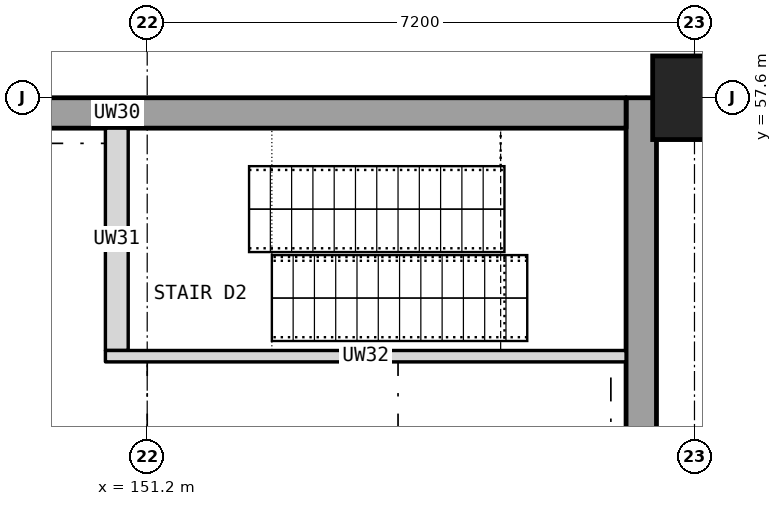
"""IFC4 building model, lengths in metres.
Left out: names, types, materials, properties, quantities, classifications, styles, units other than length and angle.
Written with IfcOpenShell. Run it as: python <this file> out.ifc"""

import sys

from ifc_helpers import new_model, si_unit, direction, frame, frame_2d, origin, origin_2d, place, context, subcontext, project, spatial, rectangle, extrude, element, save


model = new_model("IFC4")
c1 = context("Model", 3, precision=1e-05, world=origin(), true_north=direction((0.0, 1.0)))
c2 = subcontext(c1, "Body", "Model", "MODEL_VIEW")
j1 = project(units=[si_unit("LENGTHUNIT", "METRE"), si_unit("PLANEANGLEUNIT", "RADIAN")], contexts=[c1])
p1 = place(None, origin())
s1 = spatial("IfcSite", under=j1, at=p1, CompositionType="ELEMENT")
p2 = place(p1, origin())
s2 = spatial("IfcBuilding", under=s1, at=p2, CompositionType="ELEMENT")
p3 = place(p2, frame((0.0, 0.0, 12.0)))
s3 = spatial("IfcBuildingStorey", under=s2, at=p3, CompositionType="ELEMENT", Elevation=12.0)
p4 = place(p3, frame((158.4, 57.6, 0.0), z_axis=(0.0, 0.0, 1.0), x_axis=(1.0, 0.0, 0.0)))
e1 = element("IfcColumn", 1, at=p4, inside=s3, PredefinedType="COLUMN", context=c2, shape_type="SweptSolid", body=[
    extrude(rectangle(XDim=1.1, YDim=1.1, at=origin_2d()), origin(), (0.0, 0.0, 1.0), 4.5),
])
p5 = place(p3, frame((157.7, 36.0, 0.0), z_axis=(0.0, 0.0, 1.0), x_axis=(0.0, 1.0, 0.0)))
e2 = element("IfcWall", 2, at=p5, inside=s3, PredefinedType="SHEAR", context=c2, shape_type="SweptSolid", body=[
    extrude(rectangle(XDim=21.6, YDim=0.4, at=frame_2d((10.8, 0.0))), origin(), (0.0, 0.0, 1.0), 4.15),
])
p6 = place(p3, frame((144.11, 57.4, 0.0), z_axis=(0.0, 0.0, 1.0), x_axis=(1.0, 0.0, 0.0)))
e3 = element("IfcWall", 3, at=p6, inside=s3, PredefinedType="SHEAR", context=c2, shape_type="SweptSolid", body=[
    extrude(rectangle(XDim=13.39, YDim=0.4, at=frame_2d((6.695, 0.0))), origin(), (0.0, 0.0, 1.0), 4.15),
])
p7 = place(p3, frame((150.8, 54.275, 0.0), z_axis=(0.0, 0.0, 1.0), x_axis=(0.0, 1.0, 0.0)))
e4 = element("IfcWall", 4, at=p7, inside=s3, PredefinedType="SHEAR", context=c2, shape_type="SweptSolid", body=[
    extrude(rectangle(XDim=2.925, YDim=0.3, at=frame_2d((1.462, 0.0))), origin(), (0.0, 0.0, 1.0), 4.15),
])
p8 = place(p3, frame((150.65, 54.2, 0.0), z_axis=(0.0, 0.0, 1.0), x_axis=(1.0, 0.0, 0.0)))
e5 = element("IfcWall", 5, at=p8, inside=s3, PredefinedType="SHEAR", context=c2, shape_type="SweptSolid", body=[
    extrude(rectangle(XDim=6.85, YDim=0.15, at=frame_2d((3.425, 0.0))), origin(), (0.0, 0.0, 1.0), 4.15),
])
p9 = place(p3, frame((157.9, 57.6, 0.0), z_axis=(0.0, 0.0, 1.0), x_axis=(1.0, 0.0, 0.0)))
e6 = element("IfcWall", 6, at=p9, inside=s3, PredefinedType="PARTITIONING", context=c2, shape_type="SweptSolid", body=[
    extrude(rectangle(XDim=10.1, YDim=0.15, at=frame_2d((5.05, 0.0))), origin(), (0.0, 0.0, 1.0), 4.0),
])
save(model, sys.argv[1])
